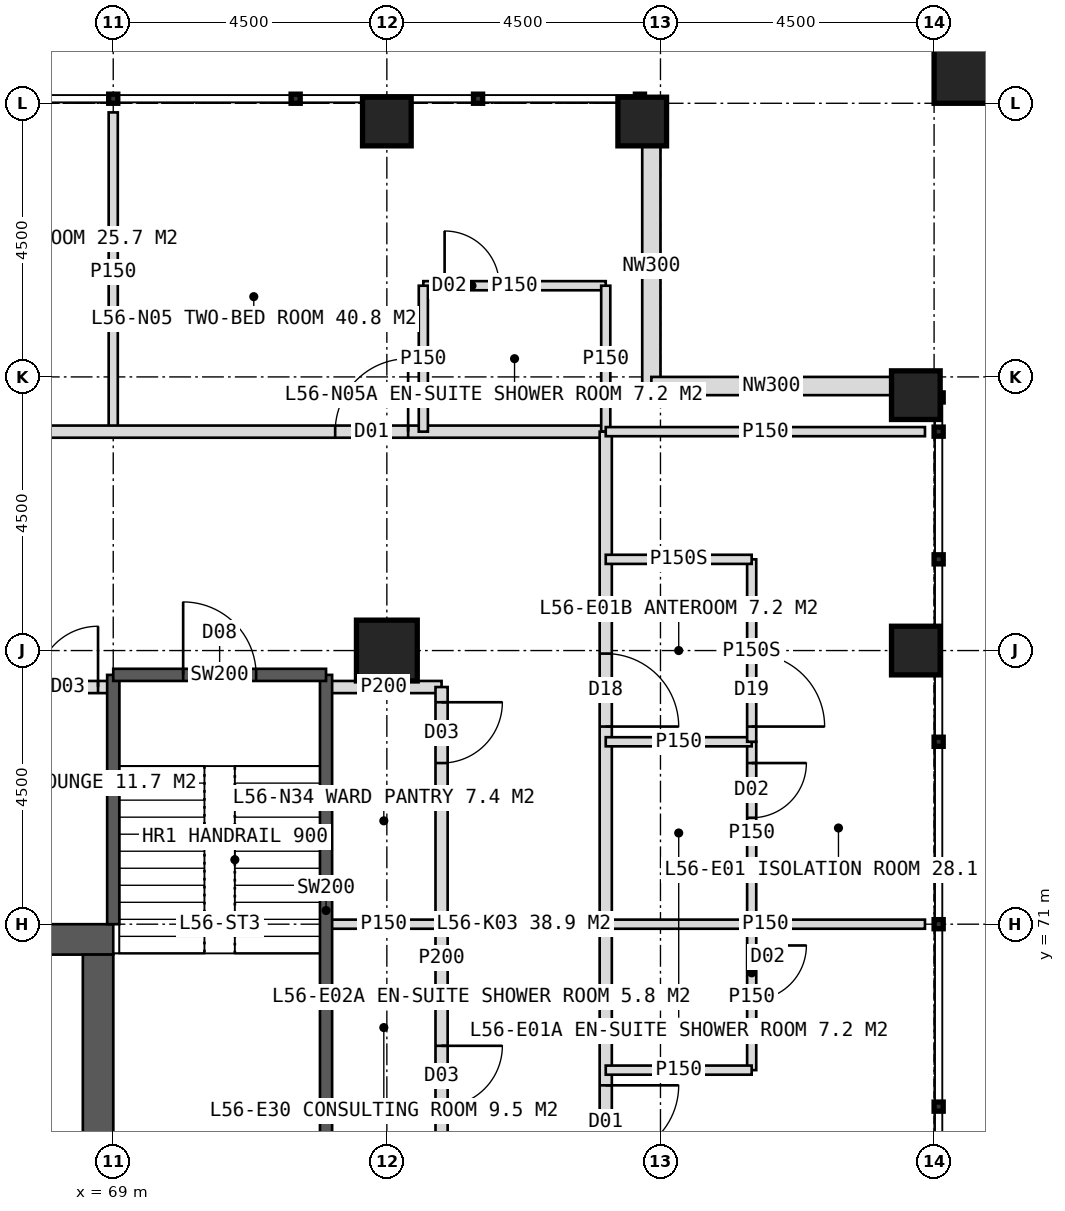
"""IFC4 building model, lengths in metres.
Left out: names, types, materials, properties, quantities, classifications, styles, units other than length and angle.
Written with IfcOpenShell. Run it as: python <this file> out.ifc"""

import sys

from ifc_helpers import new_model, si_unit, direction, frame, frame_2d, origin, origin_2d, place, context, subcontext, project, spatial, rectangle, hollow_rectangle, extrude, element, fill, save


model = new_model("IFC4")
c1 = context("Model", 3, precision=1e-05, world=origin(), true_north=direction((0.0, 1.0)))
c2 = subcontext(c1, "Body", "Model", "MODEL_VIEW")
j1 = project(units=[si_unit("LENGTHUNIT", "METRE"), si_unit("PLANEANGLEUNIT", "RADIAN")], contexts=[c1])
p1 = place(None, origin())
s1 = spatial("IfcSite", under=j1, at=p1, CompositionType="ELEMENT")
p2 = place(p1, origin())
s2 = spatial("IfcBuilding", under=s1, at=p2, CompositionType="ELEMENT")
p3 = place(p2, frame((0.0, 0.0, 233.0)))
s3 = spatial("IfcBuildingStorey", under=s2, at=p3, CompositionType="ELEMENT", Elevation=233.0)
p4 = place(p3, frame((51.0, 70.75, 0.0), z_axis=(0.0, 0.0, 1.0), x_axis=(1.0, 0.0, 0.0)))
e1 = element("IfcWall", 1, at=p4, inside=s3, PredefinedType="SHEAR", context=c2, shape_type="SweptSolid", body=[
    extrude(rectangle(XDim=18.0, YDim=0.5, at=frame_2d((9.0, 0.0))), origin(), (0.0, 0.0, 1.0), 4.0),
])
p5 = place(p4, frame((8.1, 0.0, 0.0)))
e2 = element("IfcOpeningElement", 2, at=p5, cuts=e1, PredefinedType="OPENING", context=c2, shape_type="SweptSolid", body=[
    extrude(rectangle(XDim=1.8, YDim=2.2, at=frame_2d((0.9, 1.1))), frame((0.0, 0.26, 0.0), z_axis=(0.0, -1.0, 0.0), x_axis=(1.0, 0.0, 0.0)), (0.0, 0.0, 1.0), 0.52),
])
p6 = place(p3, frame((68.75, 53.5, 0.0), z_axis=(0.0, 0.0, 1.0), x_axis=(0.0, 1.0, 0.0)))
e3 = element("IfcWall", 3, at=p6, inside=s3, PredefinedType="SHEAR", context=c2, shape_type="SweptSolid", body=[
    extrude(rectangle(XDim=17.0, YDim=0.5, at=frame_2d((8.5, 0.0))), origin(), (0.0, 0.0, 1.0), 4.0),
])
p7 = place(p6, frame((9.6, 0.0, 0.0)))
e4 = element("IfcOpeningElement", 4, at=p7, cuts=e3, PredefinedType="OPENING", context=c2, shape_type="SweptSolid", body=[
    extrude(rectangle(XDim=1.5, YDim=2.2, at=frame_2d((0.75, 1.1))), frame((0.0, 0.26, 0.0), z_axis=(0.0, -1.0, 0.0), x_axis=(1.0, 0.0, 0.0)), (0.0, 0.0, 1.0), 0.52),
])
p8 = place(p3, frame((73.5, 75.5, 0.0), z_axis=(0.0, 0.0, 1.0), x_axis=(1.0, 0.0, 0.0)))
e5 = element("IfcColumn", 5, at=p8, inside=s3, PredefinedType="COLUMN", context=c2, shape_type="SweptSolid", body=[
    extrude(hollow_rectangle(XDim=1.0, YDim=1.0, WallThickness=0.1, at=origin_2d()), origin(), (0.0, 0.0, 1.0), 4.0),
])
for number, where, z_axis, x_axis in (
    (6, (73.5, 84.2, 0.0), (0.0, 0.0, 1.0), (1.0, 0.0, 0.0)),
    (7, (82.2, 75.5, 0.0), (0.0, 0.0, 1.0), (1.0, 0.0, 0.0)),
    (8, (77.7, 84.2, 0.0), (0.0, 0.0, 1.0), (1.0, 0.0, 0.0)),
    (9, (82.2, 79.7, 0.0), (0.0, 0.0, 1.0), (1.0, 0.0, 0.0)),
):
    element("IfcColumn", number, at=place(p3, frame(where, z_axis=z_axis, x_axis=x_axis)), inside=s3, PredefinedType="COLUMN", context=c2, shape_type="SweptSolid", body=[
        extrude(hollow_rectangle(XDim=0.8, YDim=0.8, WallThickness=0.08, at=origin_2d()), origin(), (0.0, 0.0, 1.0), 4.0),
    ])
p9 = place(p3, frame((83.1, 85.1, 0.0), z_axis=(0.0, 0.0, 1.0), x_axis=(1.0, 0.0, 0.0)))
e10 = element("IfcColumn", 10, at=p9, inside=s3, PredefinedType="COLUMN", context=c2, shape_type="SweptSolid", body=[
    extrude(hollow_rectangle(XDim=1.2, YDim=1.2, WallThickness=0.07, at=origin_2d()), origin(), (0.0, 0.0, 1.0), 4.0),
])
for number, where, z_axis, x_axis in (
    (11, (77.85, 83.8, 0.0), (0.0, 0.0, 1.0), (0.0, -1.0, 0.0)),
    (12, (77.85, 79.85, 0.0), (0.0, 0.0, 1.0), (1.0, 0.0, 0.0)),
):
    element("IfcWall", number, at=place(p3, frame(where, z_axis=z_axis, x_axis=x_axis)), inside=s3, PredefinedType="ELEMENTEDWALL", context=c2, shape_type="SweptSolid", body=[
        extrude(rectangle(XDim=3.95, YDim=0.3, at=frame_2d((1.975, 0.0))), origin(), (0.0, 0.0, 1.0), 2.85),
    ])
p10 = place(p3, frame((69.0, 79.1, 0.0), z_axis=(0.0, 0.0, 1.0), x_axis=(0.0, 1.0, 0.0)))
e13 = element("IfcWall", 13, at=p10, inside=s3, PredefinedType="PARTITIONING", context=c2, shape_type="SweptSolid", body=[
    extrude(rectangle(XDim=5.25, YDim=0.15, at=frame_2d((2.625, 0.0))), origin(), (0.0, 0.0, 1.0), 3.75),
])
p11 = place(p3, frame((42.9, 79.1, 0.0), z_axis=(0.0, 0.0, 1.0), x_axis=(1.0, 0.0, 0.0)))
e14 = element("IfcWall", 14, at=p11, inside=s3, PredefinedType="PARTITIONING", context=c2, shape_type="SweptSolid", body=[
    extrude(rectangle(XDim=34.2, YDim=0.2, at=frame_2d((17.1, 0.0))), origin(), (0.0, 0.0, 1.0), 3.75),
])
p12 = place(p11, frame((3.55, 0.0, 0.0)))
e15 = element("IfcOpeningElement", 15, at=p12, cuts=e14, PredefinedType="OPENING", context=c2, shape_type="SweptSolid", body=[
    extrude(rectangle(XDim=1.0, YDim=2.1, at=frame_2d((0.5, 1.05))), frame((0.0, 0.11, 0.0), z_axis=(0.0, -1.0, 0.0), x_axis=(1.0, 0.0, 0.0)), (0.0, 0.0, 1.0), 0.22),
])
p13 = place(p11, frame((10.75, 0.0, 0.0)))
e16 = element("IfcOpeningElement", 16, at=p13, cuts=e14, PredefinedType="OPENING", context=c2, shape_type="SweptSolid", body=[
    extrude(rectangle(XDim=1.2, YDim=2.2, at=frame_2d((0.6, 1.1))), frame((0.0, 0.11, 0.0), z_axis=(0.0, -1.0, 0.0), x_axis=(1.0, 0.0, 0.0)), (0.0, 0.0, 1.0), 0.22),
])
p14 = place(p11, frame((16.25, 0.0, 0.0)))
e17 = element("IfcOpeningElement", 17, at=p14, cuts=e14, PredefinedType="OPENING", context=c2, shape_type="SweptSolid", body=[
    extrude(rectangle(XDim=1.2, YDim=2.2, at=frame_2d((0.6, 1.1))), frame((0.0, 0.11, 0.0), z_axis=(0.0, -1.0, 0.0), x_axis=(1.0, 0.0, 0.0)), (0.0, 0.0, 1.0), 0.22),
])
p15 = place(p11, frame((22.75, 0.0, 0.0)))
e18 = element("IfcOpeningElement", 18, at=p15, cuts=e14, PredefinedType="OPENING", context=c2, shape_type="SweptSolid", body=[
    extrude(rectangle(XDim=1.2, YDim=2.2, at=frame_2d((0.6, 1.1))), frame((0.0, 0.11, 0.0), z_axis=(0.0, -1.0, 0.0), x_axis=(1.0, 0.0, 0.0)), (0.0, 0.0, 1.0), 0.22),
])
p16 = place(p11, frame((29.75, 0.0, 0.0)))
e19 = element("IfcOpeningElement", 19, at=p16, cuts=e14, PredefinedType="OPENING", context=c2, shape_type="SweptSolid", body=[
    extrude(rectangle(XDim=1.2, YDim=2.2, at=frame_2d((0.6, 1.1))), frame((0.0, 0.11, 0.0), z_axis=(0.0, -1.0, 0.0), x_axis=(1.0, 0.0, 0.0)), (0.0, 0.0, 1.0), 0.22),
])
p17 = place(p3, frame((74.1, 81.5, 0.0), z_axis=(0.0, 0.0, 1.0), x_axis=(1.0, 0.0, 0.0)))
e20 = element("IfcWall", 20, at=p17, inside=s3, PredefinedType="PARTITIONING", context=c2, shape_type="SweptSolid", body=[
    extrude(rectangle(XDim=3.0, YDim=0.15, at=frame_2d((1.5, 0.0))), origin(), (0.0, 0.0, 1.0), 3.75),
])
p18 = place(p17, frame((0.35, 0.0, 0.0)))
e21 = element("IfcOpeningElement", 21, at=p18, cuts=e20, PredefinedType="OPENING", context=c2, shape_type="SweptSolid", body=[
    extrude(rectangle(XDim=0.9, YDim=2.1, at=frame_2d((0.45, 1.05))), frame((0.0, 0.085, 0.0), z_axis=(0.0, -1.0, 0.0), x_axis=(1.0, 0.0, 0.0)), (0.0, 0.0, 1.0), 0.17),
])
for number, where, z_axis, x_axis in (
    (22, (74.1, 79.1, 0.0), (0.0, 0.0, 1.0), (0.0, 1.0, 0.0)),
    (23, (77.1, 79.1, 0.0), (0.0, 0.0, 1.0), (0.0, 1.0, 0.0)),
):
    element("IfcWall", number, at=place(p3, frame(where, z_axis=z_axis, x_axis=x_axis)), inside=s3, PredefinedType="PARTITIONING", context=c2, shape_type="SweptSolid", body=[
        extrude(rectangle(XDim=2.4, YDim=0.15, at=frame_2d((1.2, 0.0))), origin(), (0.0, 0.0, 1.0), 3.75),
    ])
p19 = place(p3, frame((62.25, 74.9, 0.0), z_axis=(0.0, 0.0, 1.0), x_axis=(1.0, 0.0, 0.0)))
e24 = element("IfcWall", 24, at=p19, inside=s3, PredefinedType="PARTITIONING", context=c2, shape_type="SweptSolid", body=[
    extrude(rectangle(XDim=6.75, YDim=0.2, at=frame_2d((3.375, 0.0))), origin(), (0.0, 0.0, 1.0), 3.75),
])
p20 = place(p19, frame((0.325, 0.0, 0.0)))
e25 = element("IfcOpeningElement", 25, at=p20, cuts=e24, PredefinedType="OPENING", context=c2, shape_type="SweptSolid", body=[
    extrude(rectangle(XDim=1.0, YDim=2.1, at=frame_2d((0.5, 1.05))), frame((0.0, 0.11, 0.0), z_axis=(0.0, -1.0, 0.0), x_axis=(1.0, 0.0, 0.0)), (0.0, 0.0, 1.0), 0.22),
])
p21 = place(p19, frame((5.5, 0.0, 0.0)))
e26 = element("IfcOpeningElement", 26, at=p21, cuts=e24, PredefinedType="OPENING", context=c2, shape_type="SweptSolid", body=[
    extrude(rectangle(XDim=1.0, YDim=2.1, at=frame_2d((0.5, 1.05))), frame((0.0, 0.11, 0.0), z_axis=(0.0, -1.0, 0.0), x_axis=(1.0, 0.0, 0.0)), (0.0, 0.0, 1.0), 0.22),
])
p22 = place(p3, frame((72.5, 74.9, 0.0), z_axis=(0.0, 0.0, 1.0), x_axis=(1.0, 0.0, 0.0)))
e27 = element("IfcWall", 27, at=p22, inside=s3, PredefinedType="PARTITIONING", context=c2, shape_type="SweptSolid", body=[
    extrude(rectangle(XDim=1.9, YDim=0.2, at=frame_2d((0.95, 0.0))), origin(), (0.0, 0.0, 1.0), 3.75),
])
p23 = place(p3, frame((77.1, 71.0, 0.0), z_axis=(0.0, 0.0, 1.0), x_axis=(1.0, 0.0, 0.0)))
e28 = element("IfcWall", 28, at=p23, inside=s3, PredefinedType="PARTITIONING", context=c2, shape_type="SweptSolid", body=[
    extrude(rectangle(XDim=5.25, YDim=0.15, at=frame_2d((2.625, 0.0))), origin(), (0.0, 0.0, 1.0), 3.75),
])
p24 = place(p3, frame((77.1, 79.1, 0.0), z_axis=(0.0, 0.0, 1.0), x_axis=(0.0, -1.0, 0.0)))
e29 = element("IfcWall", 29, at=p24, inside=s3, PredefinedType="PARTITIONING", context=c2, shape_type="SweptSolid", body=[
    extrude(rectangle(XDim=34.2, YDim=0.2, at=frame_2d((17.1, 0.0))), origin(), (0.0, 0.0, 1.0), 3.75),
])
p25 = place(p24, frame((3.65, 0.0, 0.0)))
e30 = element("IfcOpeningElement", 30, at=p25, cuts=e29, PredefinedType="OPENING", context=c2, shape_type="SweptSolid", body=[
    extrude(rectangle(XDim=1.2, YDim=2.2, at=frame_2d((0.6, 1.1))), frame((0.0, 0.11, 0.0), z_axis=(0.0, -1.0, 0.0), x_axis=(1.0, 0.0, 0.0)), (0.0, 0.0, 1.0), 0.22),
])
p26 = place(p24, frame((10.75, 0.0, 0.0)))
e31 = element("IfcOpeningElement", 31, at=p26, cuts=e29, PredefinedType="OPENING", context=c2, shape_type="SweptSolid", body=[
    extrude(rectangle(XDim=1.2, YDim=2.2, at=frame_2d((0.6, 1.1))), frame((0.0, 0.11, 0.0), z_axis=(0.0, -1.0, 0.0), x_axis=(1.0, 0.0, 0.0)), (0.0, 0.0, 1.0), 0.22),
])
p27 = place(p24, frame((15.1, 0.0, 0.0)))
e32 = element("IfcOpeningElement", 32, at=p27, cuts=e29, PredefinedType="OPENING", context=c2, shape_type="SweptSolid", body=[
    extrude(rectangle(XDim=1.0, YDim=2.1, at=frame_2d((0.5, 1.05))), frame((0.0, 0.11, 0.0), z_axis=(0.0, -1.0, 0.0), x_axis=(1.0, 0.0, 0.0)), (0.0, 0.0, 1.0), 0.22),
])
p28 = place(p24, frame((19.75, 0.0, 0.0)))
e33 = element("IfcOpeningElement", 33, at=p28, cuts=e29, PredefinedType="OPENING", context=c2, shape_type="SweptSolid", body=[
    extrude(rectangle(XDim=1.2, YDim=2.2, at=frame_2d((0.6, 1.1))), frame((0.0, 0.11, 0.0), z_axis=(0.0, -1.0, 0.0), x_axis=(1.0, 0.0, 0.0)), (0.0, 0.0, 1.0), 0.22),
])
p29 = place(p24, frame((30.35, 0.0, 0.0)))
e34 = element("IfcOpeningElement", 34, at=p29, cuts=e29, PredefinedType="OPENING", context=c2, shape_type="SweptSolid", body=[
    extrude(rectangle(XDim=1.2, YDim=2.2, at=frame_2d((0.6, 1.1))), frame((0.0, 0.11, 0.0), z_axis=(0.0, -1.0, 0.0), x_axis=(1.0, 0.0, 0.0)), (0.0, 0.0, 1.0), 0.22),
])
p30 = place(p3, frame((77.1, 79.1, 0.0), z_axis=(0.0, 0.0, 1.0), x_axis=(1.0, 0.0, 0.0)))
e35 = element("IfcWall", 35, at=p30, inside=s3, PredefinedType="PARTITIONING", context=c2, shape_type="SweptSolid", body=[
    extrude(rectangle(XDim=5.25, YDim=0.15, at=frame_2d((2.625, 0.0))), origin(), (0.0, 0.0, 1.0), 3.75),
])
p31 = place(p3, frame((79.5, 74.0, 0.0), z_axis=(0.0, 0.0, 1.0), x_axis=(0.0, -1.0, 0.0)))
e36 = element("IfcWall", 36, at=p31, inside=s3, PredefinedType="PARTITIONING", context=c2, shape_type="SweptSolid", body=[
    extrude(rectangle(XDim=3.0, YDim=0.15, at=frame_2d((1.5, 0.0))), origin(), (0.0, 0.0, 1.0), 3.75),
])
p32 = place(p31, frame((0.35, 0.0, 0.0)))
e37 = element("IfcOpeningElement", 37, at=p32, cuts=e36, PredefinedType="OPENING", context=c2, shape_type="SweptSolid", body=[
    extrude(rectangle(XDim=0.9, YDim=2.1, at=frame_2d((0.45, 1.05))), frame((0.0, 0.085, 0.0), z_axis=(0.0, -1.0, 0.0), x_axis=(1.0, 0.0, 0.0)), (0.0, 0.0, 1.0), 0.17),
])
p33 = place(p3, frame((77.1, 74.0, 0.0), z_axis=(0.0, 0.0, 1.0), x_axis=(1.0, 0.0, 0.0)))
e38 = element("IfcWall", 38, at=p33, inside=s3, PredefinedType="PARTITIONING", context=c2, shape_type="SweptSolid", body=[
    extrude(rectangle(XDim=2.4, YDim=0.15, at=frame_2d((1.2, 0.0))), origin(), (0.0, 0.0, 1.0), 3.75),
])
p34 = place(p3, frame((79.5, 77.0, 0.0), z_axis=(0.0, 0.0, 1.0), x_axis=(0.0, -1.0, 0.0)))
e39 = element("IfcWall", 39, at=p34, inside=s3, PredefinedType="PARTITIONING", context=c2, shape_type="SweptSolid", body=[
    extrude(rectangle(XDim=3.0, YDim=0.15, at=frame_2d((1.5, 0.0))), origin(), (0.0, 0.0, 1.0), 3.75),
])
p35 = place(p34, frame((1.55, 0.0, 0.0)))
e40 = element("IfcOpeningElement", 40, at=p35, cuts=e39, PredefinedType="OPENING", context=c2, shape_type="SweptSolid", body=[
    extrude(rectangle(XDim=1.2, YDim=2.2, at=frame_2d((0.6, 1.1))), frame((0.0, 0.085, 0.0), z_axis=(0.0, -1.0, 0.0), x_axis=(1.0, 0.0, 0.0)), (0.0, 0.0, 1.0), 0.17),
])
p36 = place(p3, frame((77.1, 77.0, 0.0), z_axis=(0.0, 0.0, 1.0), x_axis=(1.0, 0.0, 0.0)))
e41 = element("IfcWall", 41, at=p36, inside=s3, PredefinedType="PARTITIONING", context=c2, shape_type="SweptSolid", body=[
    extrude(rectangle(XDim=2.4, YDim=0.15, at=frame_2d((1.2, 0.0))), origin(), (0.0, 0.0, 1.0), 3.75),
])
p37 = place(p3, frame((79.5, 71.0, 0.0), z_axis=(0.0, 0.0, 1.0), x_axis=(0.0, -1.0, 0.0)))
e42 = element("IfcWall", 42, at=p37, inside=s3, PredefinedType="PARTITIONING", context=c2, shape_type="SweptSolid", body=[
    extrude(rectangle(XDim=2.4, YDim=0.15, at=frame_2d((1.2, 0.0))), origin(), (0.0, 0.0, 1.0), 3.75),
])
p38 = place(p37, frame((0.35, 0.0, 0.0)))
e43 = element("IfcOpeningElement", 43, at=p38, cuts=e42, PredefinedType="OPENING", context=c2, shape_type="SweptSolid", body=[
    extrude(rectangle(XDim=0.9, YDim=2.1, at=frame_2d((0.45, 1.05))), frame((0.0, 0.085, 0.0), z_axis=(0.0, -1.0, 0.0), x_axis=(1.0, 0.0, 0.0)), (0.0, 0.0, 1.0), 0.17),
])
p39 = place(p3, frame((77.1, 68.6, 0.0), z_axis=(0.0, 0.0, 1.0), x_axis=(1.0, 0.0, 0.0)))
e44 = element("IfcWall", 44, at=p39, inside=s3, PredefinedType="PARTITIONING", context=c2, shape_type="SweptSolid", body=[
    extrude(rectangle(XDim=2.4, YDim=0.15, at=frame_2d((1.2, 0.0))), origin(), (0.0, 0.0, 1.0), 3.75),
])
p40 = place(p3, frame((72.5, 71.0, 0.0), z_axis=(0.0, 0.0, 1.0), x_axis=(1.0, 0.0, 0.0)))
e45 = element("IfcWall", 45, at=p40, inside=s3, PredefinedType="PARTITIONING", context=c2, shape_type="SweptSolid", body=[
    extrude(rectangle(XDim=1.9, YDim=0.15, at=frame_2d((0.95, 0.0))), origin(), (0.0, 0.0, 1.0), 3.75),
])
p41 = place(p3, frame((74.4, 74.9, 0.0), z_axis=(0.0, 0.0, 1.0), x_axis=(0.0, -1.0, 0.0)))
e46 = element("IfcWall", 46, at=p41, inside=s3, PredefinedType="PARTITIONING", context=c2, shape_type="SweptSolid", body=[
    extrude(rectangle(XDim=8.9, YDim=0.2, at=frame_2d((4.45, 0.0))), origin(), (0.0, 0.0, 1.0), 3.75),
])
p42 = place(p41, frame((0.25, 0.0, 0.0)))
e47 = element("IfcOpeningElement", 47, at=p42, cuts=e46, PredefinedType="OPENING", context=c2, shape_type="SweptSolid", body=[
    extrude(rectangle(XDim=1.0, YDim=2.1, at=frame_2d((0.5, 1.05))), frame((0.0, 0.11, 0.0), z_axis=(0.0, -1.0, 0.0), x_axis=(1.0, 0.0, 0.0)), (0.0, 0.0, 1.0), 0.22),
])
p43 = place(p41, frame((5.9, 0.0, 0.0)))
e48 = element("IfcOpeningElement", 48, at=p43, cuts=e46, PredefinedType="OPENING", context=c2, shape_type="SweptSolid", body=[
    extrude(rectangle(XDim=1.0, YDim=2.1, at=frame_2d((0.5, 1.05))), frame((0.0, 0.11, 0.0), z_axis=(0.0, -1.0, 0.0), x_axis=(1.0, 0.0, 0.0)), (0.0, 0.0, 1.0), 0.22),
])
p44 = place(p3, frame((69.0, 71.0, 0.0), z_axis=(0.0, 0.0, 1.0), x_axis=(0.0, 1.0, 0.0)))
e49 = element("IfcWall", 49, at=p44, inside=s3, PredefinedType="SOLIDWALL", context=c2, shape_type="SweptSolid", body=[
    extrude(rectangle(XDim=4.1, YDim=0.2, at=frame_2d((2.05, 0.0))), origin(), (0.0, 0.0, 1.0), 3.75),
])
p45 = place(p3, frame((72.5, 67.35, 0.0), z_axis=(0.0, 0.0, 1.0), x_axis=(0.0, 1.0, 0.0)))
e50 = element("IfcWall", 50, at=p45, inside=s3, PredefinedType="SOLIDWALL", context=c2, shape_type="SweptSolid", body=[
    extrude(rectangle(XDim=7.75, YDim=0.2, at=frame_2d((3.875, 0.0))), origin(), (0.0, 0.0, 1.0), 3.75),
])
p46 = place(p3, frame((69.0, 75.1, 0.0), z_axis=(0.0, 0.0, 1.0), x_axis=(1.0, 0.0, 0.0)))
e51 = element("IfcWall", 51, at=p46, inside=s3, PredefinedType="SOLIDWALL", context=c2, shape_type="SweptSolid", body=[
    extrude(rectangle(XDim=3.5, YDim=0.2, at=frame_2d((1.75, 0.0))), origin(), (0.0, 0.0, 1.0), 3.75),
])
p47 = place(p46, frame((1.15, 0.0, 0.0)))
e52 = element("IfcOpeningElement", 52, at=p47, cuts=e51, PredefinedType="OPENING", context=c2, shape_type="SweptSolid", body=[
    extrude(rectangle(XDim=1.2, YDim=2.1, at=frame_2d((0.6, 1.05))), frame((0.0, 0.11, 0.0), z_axis=(0.0, -1.0, 0.0), x_axis=(1.0, 0.0, 0.0)), (0.0, 0.0, 1.0), 0.22),
])
p48 = place(p16, origin())
e53 = element("IfcDoor", 53, at=p48, inside=s3, OperationType="SINGLE_SWING_RIGHT", PredefinedType="DOOR", context=c2, shape_type="SweptSolid", body=[
    extrude(rectangle(XDim=1.2, YDim=2.2, at=frame_2d((0.6, 1.1))), frame((0.0, 0.025, 0.0), z_axis=(0.0, -1.0, 0.0), x_axis=(1.0, 0.0, 0.0)), (0.0, 0.0, 1.0), 0.05),
])
fill(e19, e53)
p49 = place(p18, origin())
e54 = element("IfcDoor", 54, at=p49, inside=s3, OperationType="SINGLE_SWING_LEFT", PredefinedType="DOOR", context=c2, shape_type="SweptSolid", body=[
    extrude(rectangle(XDim=0.9, YDim=2.1, at=frame_2d((0.45, 1.05))), frame((0.0, 0.025, 0.0), z_axis=(0.0, -1.0, 0.0), x_axis=(1.0, 0.0, 0.0)), (0.0, 0.0, 1.0), 0.05),
])
fill(e21, e54)
p50 = place(p21, origin())
e55 = element("IfcDoor", 55, at=p50, inside=s3, OperationType="SINGLE_SWING_RIGHT", PredefinedType="DOOR", context=c2, shape_type="SweptSolid", body=[
    extrude(rectangle(XDim=1.0, YDim=2.1, at=frame_2d((0.5, 1.05))), frame((0.0, 0.025, 0.0), z_axis=(0.0, -1.0, 0.0), x_axis=(1.0, 0.0, 0.0)), (0.0, 0.0, 1.0), 0.05),
])
fill(e26, e55)
p51 = place(p42, origin())
e56 = element("IfcDoor", 56, at=p51, inside=s3, OperationType="SINGLE_SWING_LEFT", PredefinedType="DOOR", context=c2, shape_type="SweptSolid", body=[
    extrude(rectangle(XDim=1.0, YDim=2.1, at=frame_2d((0.5, 1.05))), frame((0.0, 0.025, 0.0), z_axis=(0.0, -1.0, 0.0), x_axis=(1.0, 0.0, 0.0)), (0.0, 0.0, 1.0), 0.05),
])
fill(e47, e56)
p52 = place(p35, origin())
e57 = element("IfcDoor", 57, at=p52, inside=s3, OperationType="SINGLE_SWING_RIGHT", PredefinedType="DOOR", context=c2, shape_type="SweptSolid", body=[
    extrude(rectangle(XDim=1.2, YDim=2.2, at=frame_2d((0.6, 1.1))), frame((0.0, 0.025, 0.0), z_axis=(0.0, -1.0, 0.0), x_axis=(1.0, 0.0, 0.0)), (0.0, 0.0, 1.0), 0.05),
])
fill(e40, e57)
p53 = place(p25, origin())
e58 = element("IfcDoor", 58, at=p53, inside=s3, OperationType="SINGLE_SWING_RIGHT", PredefinedType="DOOR", context=c2, shape_type="SweptSolid", body=[
    extrude(rectangle(XDim=1.2, YDim=2.2, at=frame_2d((0.6, 1.1))), frame((0.0, 0.025, 0.0), z_axis=(0.0, -1.0, 0.0), x_axis=(1.0, 0.0, 0.0)), (0.0, 0.0, 1.0), 0.05),
])
fill(e30, e58)
p54 = place(p32, origin())
e59 = element("IfcDoor", 59, at=p54, inside=s3, OperationType="SINGLE_SWING_LEFT", PredefinedType="DOOR", context=c2, shape_type="SweptSolid", body=[
    extrude(rectangle(XDim=0.9, YDim=2.1, at=frame_2d((0.45, 1.05))), frame((0.0, 0.025, 0.0), z_axis=(0.0, -1.0, 0.0), x_axis=(1.0, 0.0, 0.0)), (0.0, 0.0, 1.0), 0.05),
])
fill(e37, e59)
p55 = place(p26, origin())
e60 = element("IfcDoor", 60, at=p55, inside=s3, OperationType="SINGLE_SWING_LEFT", PredefinedType="DOOR", context=c2, shape_type="SweptSolid", body=[
    extrude(rectangle(XDim=1.2, YDim=2.2, at=frame_2d((0.6, 1.1))), frame((0.0, 0.025, 0.0), z_axis=(0.0, -1.0, 0.0), x_axis=(1.0, 0.0, 0.0)), (0.0, 0.0, 1.0), 0.05),
])
fill(e31, e60)
p56 = place(p38, origin())
e61 = element("IfcDoor", 61, at=p56, inside=s3, OperationType="SINGLE_SWING_LEFT", PredefinedType="DOOR", context=c2, shape_type="SweptSolid", body=[
    extrude(rectangle(XDim=0.9, YDim=2.1, at=frame_2d((0.45, 1.05))), frame((0.0, 0.025, 0.0), z_axis=(0.0, -1.0, 0.0), x_axis=(1.0, 0.0, 0.0)), (0.0, 0.0, 1.0), 0.05),
])
fill(e43, e61)
p57 = place(p43, origin())
e62 = element("IfcDoor", 62, at=p57, inside=s3, OperationType="SINGLE_SWING_LEFT", PredefinedType="DOOR", context=c2, shape_type="SweptSolid", body=[
    extrude(rectangle(XDim=1.0, YDim=2.1, at=frame_2d((0.5, 1.05))), frame((0.0, 0.025, 0.0), z_axis=(0.0, -1.0, 0.0), x_axis=(1.0, 0.0, 0.0)), (0.0, 0.0, 1.0), 0.05),
])
fill(e48, e62)
p58 = place(p47, origin())
e63 = element("IfcDoor", 63, at=p58, inside=s3, OperationType="SINGLE_SWING_LEFT", PredefinedType="DOOR", context=c2, shape_type="SweptSolid", body=[
    extrude(rectangle(XDim=1.2, YDim=2.1, at=frame_2d((0.6, 1.05))), frame((0.0, 0.025, 0.0), z_axis=(0.0, -1.0, 0.0), x_axis=(1.0, 0.0, 0.0)), (0.0, 0.0, 1.0), 0.05),
])
fill(e52, e63)
save(model, sys.argv[1])
